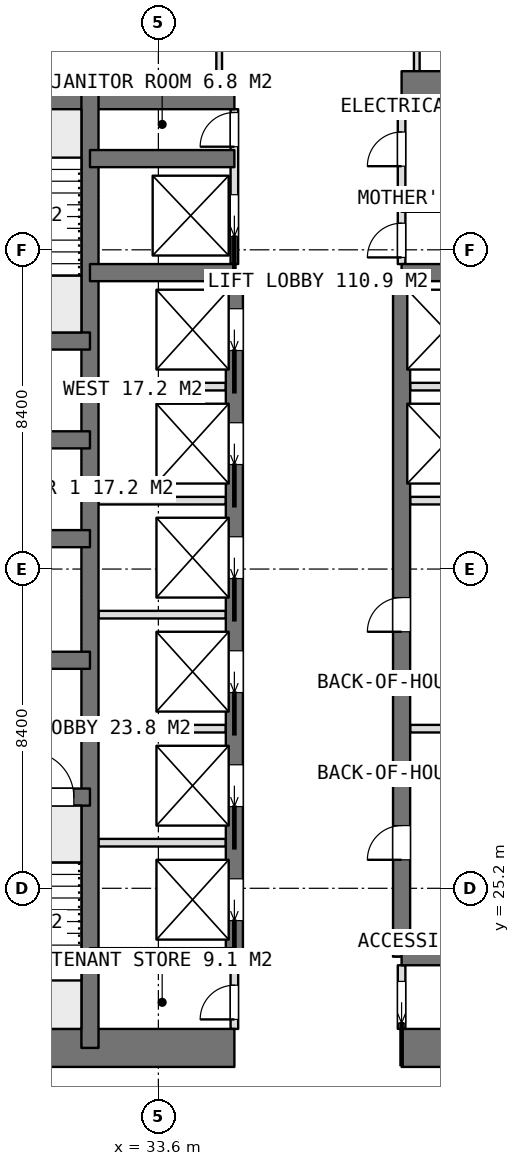
"""IFC4 building model, lengths in metres.
Left out: names, types, materials, properties, quantities, classifications, styles, units other than length and angle.
Written with IfcOpenShell. Run it as: python <this file> out.ifc"""

import sys

from ifc_helpers import new_model, si_unit, direction, frame, frame_2d, origin, place, context, subcontext, project, spatial, rectangle, extrude, element, fill, save


model = new_model("IFC4")
c1 = context("Model", 3, precision=1e-05, world=origin(), true_north=direction((0.0, 1.0)))
c2 = subcontext(c1, "Body", "Model", "MODEL_VIEW")
j1 = project(units=[si_unit("LENGTHUNIT", "METRE"), si_unit("PLANEANGLEUNIT", "RADIAN")], contexts=[c1])
p1 = place(None, origin())
s1 = spatial("IfcSite", under=j1, at=p1, CompositionType="ELEMENT")
p2 = place(p1, origin())
s2 = spatial("IfcBuilding", under=s1, at=p2, CompositionType="ELEMENT")
p3 = place(p2, frame((0.0, 0.0, 210.2)))
s3 = spatial("IfcBuildingStorey", under=s2, at=p3, CompositionType="ELEMENT", Elevation=210.2)
p4 = place(p3, frame((25.2, 21.0, 0.0), z_axis=(0.0, 0.0, 1.0), x_axis=(1.0, 0.0, 0.0)))
e1 = element("IfcWall", 1, at=p4, inside=s3, PredefinedType="SHEAR", context=c2, shape_type="SweptSolid", body=[
    extrude(rectangle(XDim=10.4, YDim=1.0, at=frame_2d((5.2, 0.0))), origin(), (0.0, 0.0, 1.0), 3.75),
])
p5 = place(p3, frame((40.0, 21.0, 0.0), z_axis=(0.0, 0.0, 1.0), x_axis=(1.0, 0.0, 0.0)))
e2 = element("IfcWall", 2, at=p5, inside=s3, PredefinedType="SHEAR", context=c2, shape_type="SweptSolid", body=[
    extrude(rectangle(XDim=10.4, YDim=1.0, at=frame_2d((5.2, 0.0))), origin(), (0.0, 0.0, 1.0), 3.75),
])
p6 = place(p3, frame((25.2, 46.2, 0.0), z_axis=(0.0, 0.0, 1.0), x_axis=(1.0, 0.0, 0.0)))
e3 = element("IfcWall", 3, at=p6, inside=s3, PredefinedType="SHEAR", context=c2, shape_type="SweptSolid", body=[
    extrude(rectangle(XDim=10.4, YDim=1.0, at=frame_2d((5.2, 0.0))), origin(), (0.0, 0.0, 1.0), 3.75),
])
p7 = place(p3, frame((40.0, 46.2, 0.0), z_axis=(0.0, 0.0, 1.0), x_axis=(1.0, 0.0, 0.0)))
e4 = element("IfcWall", 4, at=p7, inside=s3, PredefinedType="SHEAR", context=c2, shape_type="SweptSolid", body=[
    extrude(rectangle(XDim=10.4, YDim=1.0, at=frame_2d((5.2, 0.0))), origin(), (0.0, 0.0, 1.0), 3.75),
])
p8 = place(p3, frame((31.8, 21.0, 0.0), z_axis=(0.0, 0.0, 1.0), x_axis=(0.0, 1.0, 0.0)))
e5 = element("IfcWall", 5, at=p8, inside=s3, PredefinedType="SHEAR", context=c2, shape_type="SweptSolid", body=[
    extrude(rectangle(XDim=25.2, YDim=0.45, at=frame_2d((12.6, 0.0))), origin(), (0.0, 0.0, 1.0), 3.75),
])
p9 = place(p3, frame((35.6, 23.4, 0.0), z_axis=(0.0, 0.0, 1.0), x_axis=(0.0, 1.0, 0.0)))
e6 = element("IfcWall", 6, at=p9, inside=s3, PredefinedType="SHEAR", context=c2, shape_type="SweptSolid", body=[
    extrude(rectangle(XDim=18.0, YDim=0.45, at=frame_2d((9.0, 0.0))), origin(), (0.0, 0.0, 1.0), 3.75),
])
p10 = place(p9, frame((0.95, 0.0, 0.0)))
e7 = element("IfcOpeningElement", 7, at=p10, cuts=e6, PredefinedType="OPENING", context=c2, shape_type="SweptSolid", body=[
    extrude(rectangle(XDim=1.1, YDim=2.1, at=frame_2d((0.55, 1.05))), frame((0.0, 0.235, 0.0), z_axis=(0.0, -1.0, 0.0), x_axis=(1.0, 0.0, 0.0)), (0.0, 0.0, 1.0), 0.47),
])
p11 = place(p9, frame((3.95, 0.0, 0.0)))
e8 = element("IfcOpeningElement", 8, at=p11, cuts=e6, PredefinedType="OPENING", context=c2, shape_type="SweptSolid", body=[
    extrude(rectangle(XDim=1.1, YDim=2.1, at=frame_2d((0.55, 1.05))), frame((0.0, 0.235, 0.0), z_axis=(0.0, -1.0, 0.0), x_axis=(1.0, 0.0, 0.0)), (0.0, 0.0, 1.0), 0.47),
])
p12 = place(p9, frame((6.95, 0.0, 0.0)))
e9 = element("IfcOpeningElement", 9, at=p12, cuts=e6, PredefinedType="OPENING", context=c2, shape_type="SweptSolid", body=[
    extrude(rectangle(XDim=1.1, YDim=2.1, at=frame_2d((0.55, 1.05))), frame((0.0, 0.235, 0.0), z_axis=(0.0, -1.0, 0.0), x_axis=(1.0, 0.0, 0.0)), (0.0, 0.0, 1.0), 0.47),
])
p13 = place(p9, frame((9.95, 0.0, 0.0)))
e10 = element("IfcOpeningElement", 10, at=p13, cuts=e6, PredefinedType="OPENING", context=c2, shape_type="SweptSolid", body=[
    extrude(rectangle(XDim=1.1, YDim=2.1, at=frame_2d((0.55, 1.05))), frame((0.0, 0.235, 0.0), z_axis=(0.0, -1.0, 0.0), x_axis=(1.0, 0.0, 0.0)), (0.0, 0.0, 1.0), 0.47),
])
p14 = place(p9, frame((12.95, 0.0, 0.0)))
e11 = element("IfcOpeningElement", 11, at=p14, cuts=e6, PredefinedType="OPENING", context=c2, shape_type="SweptSolid", body=[
    extrude(rectangle(XDim=1.1, YDim=2.1, at=frame_2d((0.55, 1.05))), frame((0.0, 0.235, 0.0), z_axis=(0.0, -1.0, 0.0), x_axis=(1.0, 0.0, 0.0)), (0.0, 0.0, 1.0), 0.47),
])
p15 = place(p9, frame((15.95, 0.0, 0.0)))
e12 = element("IfcOpeningElement", 12, at=p15, cuts=e6, PredefinedType="OPENING", context=c2, shape_type="SweptSolid", body=[
    extrude(rectangle(XDim=1.1, YDim=2.1, at=frame_2d((0.55, 1.05))), frame((0.0, 0.235, 0.0), z_axis=(0.0, -1.0, 0.0), x_axis=(1.0, 0.0, 0.0)), (0.0, 0.0, 1.0), 0.47),
])
p16 = place(p3, frame((40.0, 23.4, 0.0), z_axis=(0.0, 0.0, 1.0), x_axis=(0.0, 1.0, 0.0)))
e13 = element("IfcWall", 13, at=p16, inside=s3, PredefinedType="SHEAR", context=c2, shape_type="SweptSolid", body=[
    extrude(rectangle(XDim=18.0, YDim=0.45, at=frame_2d((9.0, 0.0))), origin(), (0.0, 0.0, 1.0), 3.75),
])
p17 = place(p16, frame((2.55, 0.0, 0.0)))
e14 = element("IfcOpeningElement", 14, at=p17, cuts=e13, PredefinedType="OPENING", context=c2, shape_type="SweptSolid", body=[
    extrude(rectangle(XDim=0.9, YDim=2.1, at=frame_2d((0.45, 1.05))), frame((0.0, 0.235, 0.0), z_axis=(0.0, -1.0, 0.0), x_axis=(1.0, 0.0, 0.0)), (0.0, 0.0, 1.0), 0.47),
])
p18 = place(p16, frame((8.55, 0.0, 0.0)))
e15 = element("IfcOpeningElement", 15, at=p18, cuts=e13, PredefinedType="OPENING", context=c2, shape_type="SweptSolid", body=[
    extrude(rectangle(XDim=0.9, YDim=2.1, at=frame_2d((0.45, 1.05))), frame((0.0, 0.235, 0.0), z_axis=(0.0, -1.0, 0.0), x_axis=(1.0, 0.0, 0.0)), (0.0, 0.0, 1.0), 0.47),
])
for number, where, z_axis, x_axis in (
    (16, (31.8, 23.4, 0.0), (0.0, 0.0, 1.0), (1.0, 0.0, 0.0)),
    (17, (31.8, 41.4, 0.0), (0.0, 0.0, 1.0), (1.0, 0.0, 0.0)),
    (18, (31.8, 44.4, 0.0), (0.0, 0.0, 1.0), (1.0, 0.0, 0.0)),
    (19, (40.0, 23.4, 0.0), (0.0, 0.0, 1.0), (1.0, 0.0, 0.0)),
    (20, (40.0, 41.4, 0.0), (0.0, 0.0, 1.0), (1.0, 0.0, 0.0)),
):
    element("IfcWall", number, at=place(p3, frame(where, z_axis=z_axis, x_axis=x_axis)), inside=s3, PredefinedType="SHEAR", context=c2, shape_type="SweptSolid", body=[
        extrude(rectangle(XDim=3.8, YDim=0.45, at=frame_2d((1.9, 0.0))), origin(), (0.0, 0.0, 1.0), 3.75),
    ])
p19 = place(p3, frame((25.2, 27.6, 0.0), z_axis=(0.0, 0.0, 1.0), x_axis=(1.0, 0.0, 0.0)))
e21 = element("IfcWall", 21, at=p19, inside=s3, PredefinedType="SHEAR", context=c2, shape_type="SweptSolid", body=[
    extrude(rectangle(XDim=6.6, YDim=0.45, at=frame_2d((3.3, 0.0))), origin(), (0.0, 0.0, 1.0), 3.75),
])
p20 = place(p19, frame((4.975, 0.0, 0.0)))
e22 = element("IfcOpeningElement", 22, at=p20, cuts=e21, PredefinedType="OPENING", context=c2, shape_type="SweptSolid", body=[
    extrude(rectangle(XDim=1.2, YDim=2.1, at=frame_2d((0.6, 1.05))), frame((0.0, 0.235, 0.0), z_axis=(0.0, -1.0, 0.0), x_axis=(1.0, 0.0, 0.0)), (0.0, 0.0, 1.0), 0.47),
])
p21 = place(p3, frame((25.2, 31.2, 0.0), z_axis=(0.0, 0.0, 1.0), x_axis=(1.0, 0.0, 0.0)))
e23 = element("IfcWall", 23, at=p21, inside=s3, PredefinedType="SHEAR", context=c2, shape_type="SweptSolid", body=[
    extrude(rectangle(XDim=6.6, YDim=0.45, at=frame_2d((3.3, 0.0))), origin(), (0.0, 0.0, 1.0), 3.75),
])
p22 = place(p21, frame((2.65, 0.0, 0.0)))
e24 = element("IfcOpeningElement", 24, at=p22, cuts=e23, PredefinedType="OPENING", context=c2, shape_type="SweptSolid", body=[
    extrude(rectangle(XDim=1.3, YDim=2.1, at=frame_2d((0.65, 1.05))), frame((0.0, 0.235, 0.0), z_axis=(0.0, -1.0, 0.0), x_axis=(1.0, 0.0, 0.0)), (0.0, 0.0, 1.0), 0.47),
])
for number, where, z_axis, x_axis in (
    (25, (25.2, 34.4, 0.0), (0.0, 0.0, 1.0), (1.0, 0.0, 0.0)),
    (26, (25.2, 37.0, 0.0), (0.0, 0.0, 1.0), (1.0, 0.0, 0.0)),
    (27, (25.2, 39.6, 0.0), (0.0, 0.0, 1.0), (1.0, 0.0, 0.0)),
):
    element("IfcWall", number, at=place(p3, frame(where, z_axis=z_axis, x_axis=x_axis)), inside=s3, PredefinedType="SHEAR", context=c2, shape_type="SweptSolid", body=[
        extrude(rectangle(XDim=6.6, YDim=0.45, at=frame_2d((3.3, 0.0))), origin(), (0.0, 0.0, 1.0), 3.75),
    ])
for number, where, z_axis, x_axis in (
    (28, (32.025, 26.4, 0.0), (0.0, 0.0, 1.0), (1.0, 0.0, 0.0)),
    (29, (32.025, 29.4, 0.0), (0.0, 0.0, 1.0), (1.0, 0.0, 0.0)),
    (30, (32.025, 32.4, 0.0), (0.0, 0.0, 1.0), (1.0, 0.0, 0.0)),
    (31, (32.025, 35.4, 0.0), (0.0, 0.0, 1.0), (1.0, 0.0, 0.0)),
    (32, (32.025, 38.4, 0.0), (0.0, 0.0, 1.0), (1.0, 0.0, 0.0)),
):
    element("IfcWall", number, at=place(p3, frame(where, z_axis=z_axis, x_axis=x_axis)), inside=s3, PredefinedType="PARTITIONING", context=c2, shape_type="SweptSolid", body=[
        extrude(rectangle(XDim=3.35, YDim=0.2, at=frame_2d((1.675, 0.0))), origin(), (0.0, 0.0, 1.0), 3.5),
    ])
for number, where, z_axis, x_axis in (
    (33, (40.225, 29.4, 0.0), (0.0, 0.0, 1.0), (1.0, 0.0, 0.0)),
    (34, (40.225, 35.4, 0.0), (0.0, 0.0, 1.0), (1.0, 0.0, 0.0)),
    (35, (40.225, 38.4, 0.0), (0.0, 0.0, 1.0), (1.0, 0.0, 0.0)),
):
    element("IfcWall", number, at=place(p3, frame(where, z_axis=z_axis, x_axis=x_axis)), inside=s3, PredefinedType="PARTITIONING", context=c2, shape_type="SweptSolid", body=[
        extrude(rectangle(XDim=3.35, YDim=0.2, at=frame_2d((1.675, 0.0))), origin(), (0.0, 0.0, 1.0), 3.5),
    ])
p23 = place(p3, frame((40.0, 21.5, 0.0), z_axis=(0.0, 0.0, 1.0), x_axis=(0.0, 1.0, 0.0)))
e36 = element("IfcWall", 36, at=p23, inside=s3, PredefinedType="PARTITIONING", context=c2, shape_type="SweptSolid", body=[
    extrude(rectangle(XDim=1.675, YDim=0.2, at=frame_2d((0.837, 0.0))), origin(), (0.0, 0.0, 1.0), 3.5),
])
p24 = place(p23, frame((0.15, 0.0, 0.0)))
e37 = element("IfcOpeningElement", 37, at=p24, cuts=e36, PredefinedType="OPENING", context=c2, shape_type="SweptSolid", body=[
    extrude(rectangle(XDim=1.1, YDim=2.1, at=frame_2d((0.55, 1.05))), frame((0.0, 0.11, 0.0), z_axis=(0.0, -1.0, 0.0), x_axis=(1.0, 0.0, 0.0)), (0.0, 0.0, 1.0), 0.22),
])
p25 = place(p3, frame((40.0, 41.625, 0.0), z_axis=(0.0, 0.0, 1.0), x_axis=(0.0, 1.0, 0.0)))
e38 = element("IfcWall", 38, at=p25, inside=s3, PredefinedType="PARTITIONING", context=c2, shape_type="SweptSolid", body=[
    extrude(rectangle(XDim=4.075, YDim=0.2, at=frame_2d((2.038, 0.0))), origin(), (0.0, 0.0, 1.0), 3.5),
])
p26 = place(p25, frame((2.575, 0.0, 0.0)))
e39 = element("IfcOpeningElement", 39, at=p26, cuts=e38, PredefinedType="OPENING", context=c2, shape_type="SweptSolid", body=[
    extrude(rectangle(XDim=0.9, YDim=2.1, at=frame_2d((0.45, 1.05))), frame((0.0, 0.11, 0.0), z_axis=(0.0, -1.0, 0.0), x_axis=(1.0, 0.0, 0.0)), (0.0, 0.0, 1.0), 0.22),
])
p27 = place(p25, frame((0.175, 0.0, 0.0)))
e40 = element("IfcOpeningElement", 40, at=p27, cuts=e38, PredefinedType="OPENING", context=c2, shape_type="SweptSolid", body=[
    extrude(rectangle(XDim=0.9, YDim=2.1, at=frame_2d((0.45, 1.05))), frame((0.0, 0.11, 0.0), z_axis=(0.0, -1.0, 0.0), x_axis=(1.0, 0.0, 0.0)), (0.0, 0.0, 1.0), 0.22),
])
p28 = place(p3, frame((35.6, 41.625, 0.0), z_axis=(0.0, 0.0, 1.0), x_axis=(0.0, 1.0, 0.0)))
e41 = element("IfcWall", 41, at=p28, inside=s3, PredefinedType="PARTITIONING", context=c2, shape_type="SweptSolid", body=[
    extrude(rectangle(XDim=4.075, YDim=0.2, at=frame_2d((2.038, 0.0))), origin(), (0.0, 0.0, 1.0), 3.5),
])
p29 = place(p28, frame((3.088, 0.0, 0.0)))
e42 = element("IfcOpeningElement", 42, at=p29, cuts=e41, PredefinedType="OPENING", context=c2, shape_type="SweptSolid", body=[
    extrude(rectangle(XDim=0.9, YDim=2.1, at=frame_2d((0.45, 1.05))), frame((0.0, 0.11, 0.0), z_axis=(0.0, -1.0, 0.0), x_axis=(1.0, 0.0, 0.0)), (0.0, 0.0, 1.0), 0.22),
])
p30 = place(p28, frame((0.725, 0.0, 0.0)))
e43 = element("IfcOpeningElement", 43, at=p30, cuts=e41, PredefinedType="OPENING", context=c2, shape_type="SweptSolid", body=[
    extrude(rectangle(XDim=1.1, YDim=2.1, at=frame_2d((0.55, 1.05))), frame((0.0, 0.11, 0.0), z_axis=(0.0, -1.0, 0.0), x_axis=(1.0, 0.0, 0.0)), (0.0, 0.0, 1.0), 0.22),
])
p31 = place(p3, frame((35.6, 21.5, 0.0), z_axis=(0.0, 0.0, 1.0), x_axis=(0.0, 1.0, 0.0)))
e44 = element("IfcWall", 44, at=p31, inside=s3, PredefinedType="PARTITIONING", context=c2, shape_type="SweptSolid", body=[
    extrude(rectangle(XDim=1.675, YDim=0.2, at=frame_2d((0.837, 0.0))), origin(), (0.0, 0.0, 1.0), 3.5),
])
p32 = place(p31, frame((0.25, 0.0, 0.0)))
e45 = element("IfcOpeningElement", 45, at=p32, cuts=e44, PredefinedType="OPENING", context=c2, shape_type="SweptSolid", body=[
    extrude(rectangle(XDim=0.9, YDim=2.1, at=frame_2d((0.45, 1.05))), frame((0.0, 0.11, 0.0), z_axis=(0.0, -1.0, 0.0), x_axis=(1.0, 0.0, 0.0)), (0.0, 0.0, 1.0), 0.22),
])
p33 = place(p3, frame((40.0, 43.1, 0.0), z_axis=(0.0, 0.0, 1.0), x_axis=(1.0, 0.0, 0.0)))
e46 = element("IfcWall", 46, at=p33, inside=s3, PredefinedType="PARTITIONING", context=c2, shape_type="SweptSolid", body=[
    extrude(rectangle(XDim=3.575, YDim=0.2, at=frame_2d((1.788, 0.0))), origin(), (0.0, 0.0, 1.0), 3.5),
])
for number, where, z_axis, x_axis in (
    (47, (40.4, 46.7, 0.0), (0.0, 0.0, 1.0), (0.0, 1.0, 0.0)),
    (48, (35.2, 46.7, 0.0), (0.0, 0.0, 1.0), (0.0, 1.0, 0.0)),
):
    element("IfcWall", number, at=place(p3, frame(where, z_axis=z_axis, x_axis=x_axis)), inside=s3, PredefinedType="PARTITIONING", context=c2, shape_type="SweptSolid", body=[
        extrude(rectangle(XDim=2.625, YDim=0.15, at=frame_2d((1.312, 0.0))), origin(), (0.0, 0.0, 1.0), 3.5),
    ])
p34 = place(p24, origin())
e49 = element("IfcDoor", 49, at=p34, inside=s3, OperationType="SLIDING_TO_LEFT", PredefinedType="DOOR", context=c2, shape_type="SweptSolid", body=[
    extrude(rectangle(XDim=1.1, YDim=2.1, at=frame_2d((0.55, 1.05))), frame((0.0, 0.025, 0.0), z_axis=(0.0, -1.0, 0.0), x_axis=(1.0, 0.0, 0.0)), (0.0, 0.0, 1.0), 0.05),
])
fill(e37, e49)
p35 = place(p32, origin())
e50 = element("IfcDoor", 50, at=p35, inside=s3, OperationType="SINGLE_SWING_LEFT", PredefinedType="DOOR", context=c2, shape_type="SweptSolid", body=[
    extrude(rectangle(XDim=0.9, YDim=2.1, at=frame_2d((0.45, 1.05))), frame((0.0, 0.025, 0.0), z_axis=(0.0, -1.0, 0.0), x_axis=(1.0, 0.0, 0.0)), (0.0, 0.0, 1.0), 0.05),
])
fill(e45, e50)
p36 = place(p26, origin())
e51 = element("IfcDoor", 51, at=p36, inside=s3, OperationType="SINGLE_SWING_LEFT", PredefinedType="DOOR", context=c2, shape_type="SweptSolid", body=[
    extrude(rectangle(XDim=0.9, YDim=2.1, at=frame_2d((0.45, 1.05))), frame((0.0, 0.025, 0.0), z_axis=(0.0, -1.0, 0.0), x_axis=(1.0, 0.0, 0.0)), (0.0, 0.0, 1.0), 0.05),
])
fill(e39, e51)
p37 = place(p27, origin())
e52 = element("IfcDoor", 52, at=p37, inside=s3, OperationType="SINGLE_SWING_LEFT", PredefinedType="DOOR", context=c2, shape_type="SweptSolid", body=[
    extrude(rectangle(XDim=0.9, YDim=2.1, at=frame_2d((0.45, 1.05))), frame((0.0, 0.025, 0.0), z_axis=(0.0, -1.0, 0.0), x_axis=(1.0, 0.0, 0.0)), (0.0, 0.0, 1.0), 0.05),
])
fill(e40, e52)
p38 = place(p17, origin())
e53 = element("IfcDoor", 53, at=p38, inside=s3, OperationType="SINGLE_SWING_LEFT", PredefinedType="DOOR", context=c2, shape_type="SweptSolid", body=[
    extrude(rectangle(XDim=0.9, YDim=2.1, at=frame_2d((0.45, 1.05))), frame((0.0, 0.025, 0.0), z_axis=(0.0, -1.0, 0.0), x_axis=(1.0, 0.0, 0.0)), (0.0, 0.0, 1.0), 0.05),
])
fill(e14, e53)
p39 = place(p18, origin())
e54 = element("IfcDoor", 54, at=p39, inside=s3, OperationType="SINGLE_SWING_LEFT", PredefinedType="DOOR", context=c2, shape_type="SweptSolid", body=[
    extrude(rectangle(XDim=0.9, YDim=2.1, at=frame_2d((0.45, 1.05))), frame((0.0, 0.025, 0.0), z_axis=(0.0, -1.0, 0.0), x_axis=(1.0, 0.0, 0.0)), (0.0, 0.0, 1.0), 0.05),
])
fill(e15, e54)
p40 = place(p29, origin())
e55 = element("IfcDoor", 55, at=p40, inside=s3, OperationType="SINGLE_SWING_LEFT", PredefinedType="DOOR", context=c2, shape_type="SweptSolid", body=[
    extrude(rectangle(XDim=0.9, YDim=2.1, at=frame_2d((0.45, 1.05))), frame((0.0, 0.025, 0.0), z_axis=(0.0, -1.0, 0.0), x_axis=(1.0, 0.0, 0.0)), (0.0, 0.0, 1.0), 0.05),
])
fill(e42, e55)
p41 = place(p10, origin())
e56 = element("IfcDoor", 56, at=p41, inside=s3, OperationType="SLIDING_TO_LEFT", PredefinedType="USERDEFINED", context=c2, shape_type="SweptSolid", body=[
    extrude(rectangle(XDim=1.1, YDim=2.1, at=frame_2d((0.55, 1.05))), frame((0.0, 0.025, 0.0), z_axis=(0.0, -1.0, 0.0), x_axis=(1.0, 0.0, 0.0)), (0.0, 0.0, 1.0), 0.05),
])
fill(e7, e56)
p42 = place(p11, origin())
e57 = element("IfcDoor", 57, at=p42, inside=s3, OperationType="SLIDING_TO_LEFT", PredefinedType="USERDEFINED", context=c2, shape_type="SweptSolid", body=[
    extrude(rectangle(XDim=1.1, YDim=2.1, at=frame_2d((0.55, 1.05))), frame((0.0, 0.025, 0.0), z_axis=(0.0, -1.0, 0.0), x_axis=(1.0, 0.0, 0.0)), (0.0, 0.0, 1.0), 0.05),
])
fill(e8, e57)
p43 = place(p12, origin())
e58 = element("IfcDoor", 58, at=p43, inside=s3, OperationType="SLIDING_TO_LEFT", PredefinedType="USERDEFINED", context=c2, shape_type="SweptSolid", body=[
    extrude(rectangle(XDim=1.1, YDim=2.1, at=frame_2d((0.55, 1.05))), frame((0.0, 0.025, 0.0), z_axis=(0.0, -1.0, 0.0), x_axis=(1.0, 0.0, 0.0)), (0.0, 0.0, 1.0), 0.05),
])
fill(e9, e58)
p44 = place(p13, origin())
e59 = element("IfcDoor", 59, at=p44, inside=s3, OperationType="SLIDING_TO_LEFT", PredefinedType="USERDEFINED", context=c2, shape_type="SweptSolid", body=[
    extrude(rectangle(XDim=1.1, YDim=2.1, at=frame_2d((0.55, 1.05))), frame((0.0, 0.025, 0.0), z_axis=(0.0, -1.0, 0.0), x_axis=(1.0, 0.0, 0.0)), (0.0, 0.0, 1.0), 0.05),
])
fill(e10, e59)
p45 = place(p14, origin())
e60 = element("IfcDoor", 60, at=p45, inside=s3, OperationType="SLIDING_TO_LEFT", PredefinedType="USERDEFINED", context=c2, shape_type="SweptSolid", body=[
    extrude(rectangle(XDim=1.1, YDim=2.1, at=frame_2d((0.55, 1.05))), frame((0.0, 0.025, 0.0), z_axis=(0.0, -1.0, 0.0), x_axis=(1.0, 0.0, 0.0)), (0.0, 0.0, 1.0), 0.05),
])
fill(e11, e60)
p46 = place(p15, origin())
e61 = element("IfcDoor", 61, at=p46, inside=s3, OperationType="SLIDING_TO_LEFT", PredefinedType="USERDEFINED", context=c2, shape_type="SweptSolid", body=[
    extrude(rectangle(XDim=1.1, YDim=2.1, at=frame_2d((0.55, 1.05))), frame((0.0, 0.025, 0.0), z_axis=(0.0, -1.0, 0.0), x_axis=(1.0, 0.0, 0.0)), (0.0, 0.0, 1.0), 0.05),
])
fill(e12, e61)
p47 = place(p30, origin())
e62 = element("IfcDoor", 62, at=p47, inside=s3, OperationType="SLIDING_TO_LEFT", PredefinedType="USERDEFINED", context=c2, shape_type="SweptSolid", body=[
    extrude(rectangle(XDim=1.1, YDim=2.1, at=frame_2d((0.55, 1.05))), frame((0.0, 0.025, 0.0), z_axis=(0.0, -1.0, 0.0), x_axis=(1.0, 0.0, 0.0)), (0.0, 0.0, 1.0), 0.05),
])
fill(e43, e62)
p48 = place(p20, origin())
e63 = element("IfcDoor", 63, at=p48, inside=s3, OperationType="SINGLE_SWING_RIGHT", PredefinedType="DOOR", context=c2, shape_type="SweptSolid", body=[
    extrude(rectangle(XDim=1.2, YDim=2.1, at=frame_2d((0.6, 1.05))), frame((0.0, 0.025, 0.0), z_axis=(0.0, -1.0, 0.0), x_axis=(1.0, 0.0, 0.0)), (0.0, 0.0, 1.0), 0.05),
])
fill(e22, e63)
save(model, sys.argv[1])
